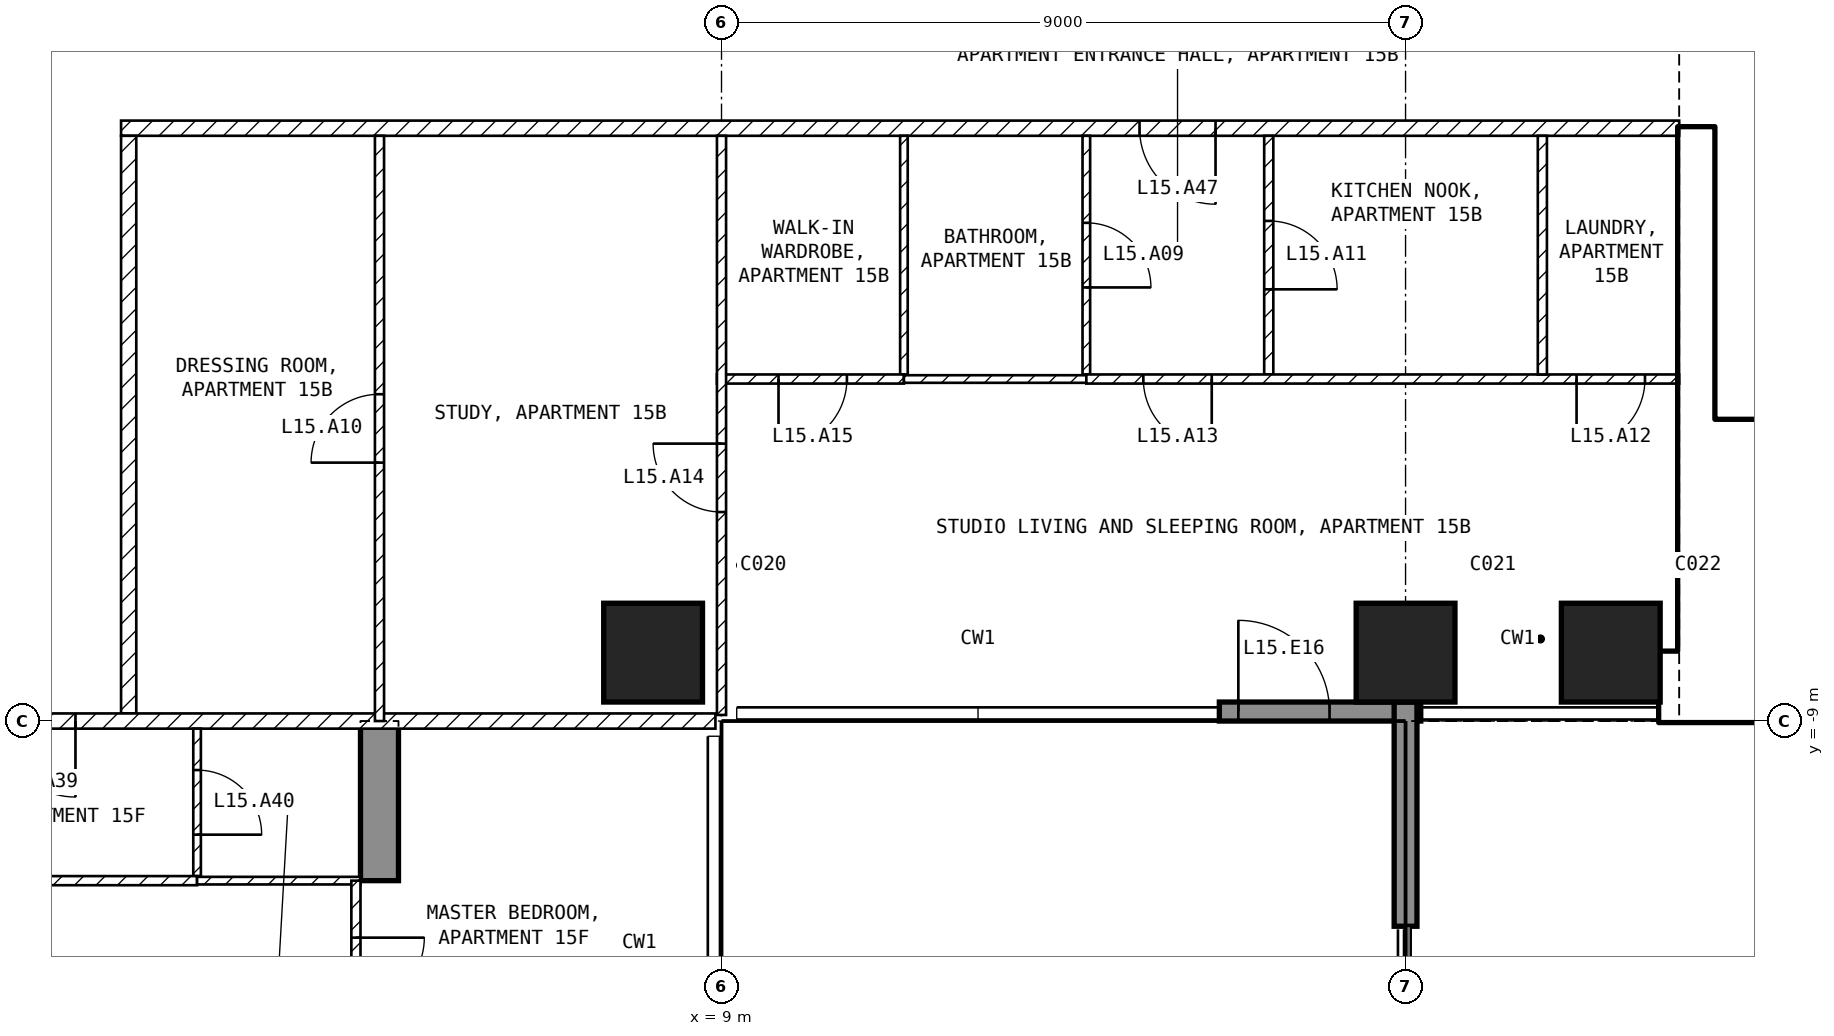
"""IFC4 building model, lengths in metres.
Left out: names, types, materials, properties, quantities, classifications, styles, units other than length and angle.
Written with IfcOpenShell. Run it as: python <this file> out.ifc"""

import sys

from ifc_helpers import new_model, si_unit, direction, frame, frame_2d, origin, origin_2d, place, context, subcontext, project, spatial, polyline, rectangle, outline, extrude, element, fill, save


model = new_model("IFC4")
c1 = context("Model", 3, precision=1e-05, world=origin(), true_north=direction((0.0, 1.0)))
c2 = subcontext(c1, "Body", "Model", "MODEL_VIEW")
j1 = project(units=[si_unit("LENGTHUNIT", "METRE"), si_unit("PLANEANGLEUNIT", "RADIAN")], contexts=[c1])
p1 = place(None, origin())
s1 = spatial("IfcSite", under=j1, at=p1, CompositionType="ELEMENT")
p2 = place(p1, origin())
s2 = spatial("IfcBuilding", under=s1, at=p2, CompositionType="ELEMENT")
p3 = place(p2, frame((0.0, 0.0, 71.5)))
s3 = spatial("IfcBuildingStorey", under=s2, at=p3, CompositionType="ELEMENT", Elevation=71.5)
for number, where, z_axis, x_axis in (
    (1, (8.1, -8.1, -0.25), (0.0, 0.0, 1.0), (1.0, 0.0, 0.0)),
    (2, (18.0, -8.1, -0.25), (0.0, 0.0, 1.0), (1.0, 0.0, 0.0)),
    (3, (20.7, -8.1, -0.25), (0.0, 0.0, 1.0), (1.0, 0.0, 0.0)),
):
    element("IfcColumn", number, at=place(p3, frame(where, z_axis=z_axis, x_axis=x_axis)), inside=s3, PredefinedType="COLUMN", context=c2, shape_type="SweptSolid", body=[
        extrude(rectangle(XDim=1.3, YDim=1.3, at=origin_2d()), origin(), (0.0, 0.0, 1.0), 3.5),
    ])
p4 = place(p3, frame((4.25, -25.45, -0.25), z_axis=(1.0, 0.0, 0.0), x_axis=(0.0, 1.0, 0.0)))
e4 = element("IfcWall", 4, at=p4, inside=s3, PredefinedType="SHEAR", context=c2, shape_type="SweptSolid", body=[
    extrude(outline(polyline([(0.0, 0.0), (4.15, 0.0), (4.15, 2.65), (6.55, 2.65), (6.55, 0.0), (11.95, 0.0), (11.95, 2.65), (14.35, 2.65), (14.35, 0.0), (16.45, 0.0), (16.45, 3.5), (0.0, 3.5), (0.0, 0.0)])), origin(), (0.0, 0.0, 1.0), 0.5),
])
p5 = place(p3, frame((15.55, -8.875, 0.0), z_axis=(0.0, 0.0, 1.0), x_axis=(1.0, 0.0, 0.0)))
e5 = element("IfcWall", 5, at=p5, inside=s3, PredefinedType="SOLIDWALL", context=c2, shape_type="SweptSolid", body=[
    extrude(rectangle(XDim=2.65, YDim=0.25, at=frame_2d((1.325, 0.0))), origin(), (0.0, 0.0, 1.0), 3.25),
])
p6 = place(p5, frame((0.25, 0.0, 0.0)))
e6 = element("IfcOpeningElement", 6, at=p6, cuts=e5, PredefinedType="OPENING", context=c2, shape_type="SweptSolid", body=[
    extrude(rectangle(XDim=1.2, YDim=2.4, at=frame_2d((0.6, 1.2))), frame((0.0, 0.135, 0.0), z_axis=(0.0, -1.0, 0.0), x_axis=(1.0, 0.0, 0.0)), (0.0, 0.0, 1.0), 0.27),
])
p7 = place(p3, frame((18.0, -8.75, 0.0), z_axis=(0.0, 0.0, 1.0), x_axis=(0.0, -1.0, 0.0)))
e7 = element("IfcWall", 7, at=p7, inside=s3, PredefinedType="SOLIDWALL", context=c2, shape_type="SweptSolid", body=[
    extrude(rectangle(XDim=2.95, YDim=0.3, at=frame_2d((1.475, 0.0))), origin(), (0.0, 0.0, 1.0), 3.25),
])
p8 = place(p3, frame((21.35, -8.55, 0.0), z_axis=(0.0, 0.0, 1.0), x_axis=(1.0, 0.0, 0.0)))
e8 = element("IfcWall", 8, at=p8, inside=s3, PredefinedType="SHEAR", context=c2, shape_type="SweptSolid", body=[
    extrude(rectangle(XDim=11.05, YDim=0.9, at=frame_2d((5.525, 0.0))), origin(), (0.0, 0.0, 1.0), 3.25),
])
p9 = place(p3, frame((21.825, -8.1, 0.0), z_axis=(0.0, 0.0, 1.0), x_axis=(0.0, 1.0, 0.0)))
e9 = element("IfcWall", 9, at=p9, inside=s3, PredefinedType="SHEAR", context=c2, shape_type="SweptSolid", body=[
    extrude(rectangle(XDim=6.9, YDim=0.45, at=frame_2d((3.45, 0.0))), origin(), (0.0, 0.0, 1.0), 3.25),
])
p10 = place(p3, frame((22.05, -5.15, 0.0), z_axis=(0.0, 0.0, 1.0), x_axis=(1.0, 0.0, 0.0)))
e10 = element("IfcWall", 10, at=p10, inside=s3, PredefinedType="SOLIDWALL", context=c2, shape_type="SweptSolid", body=[
    extrude(rectangle(XDim=6.3, YDim=0.2, at=frame_2d((3.15, 0.0))), origin(), (0.0, 0.0, 1.0), 3.25),
])
p11 = place(p10, frame((0.2, 0.0, 0.0)))
e11 = element("IfcOpeningElement", 11, at=p11, cuts=e10, PredefinedType="OPENING", context=c2, shape_type="SweptSolid", body=[
    extrude(rectangle(XDim=1.0, YDim=2.1, at=frame_2d((0.5, 1.05))), frame((0.0, 0.11, 0.0), z_axis=(0.0, -1.0, 0.0), x_axis=(1.0, 0.0, 0.0)), (0.0, 0.0, 1.0), 0.22),
])
p12 = place(p3, frame((21.6, -1.2, 0.0), z_axis=(0.0, 0.0, 1.0), x_axis=(-1.0, 0.0, 0.0)))
e12 = element("IfcWall", 12, at=p12, inside=s3, PredefinedType="PARTITIONING", context=c2, shape_type="SweptSolid", body=[
    extrude(rectangle(XDim=20.5, YDim=0.2, at=frame_2d((10.25, 0.0))), origin(), (0.0, 0.0, 1.0), 3.25),
])
p13 = place(p12, frame((6.1, 0.0, 0.0)))
e13 = element("IfcOpeningElement", 13, at=p13, cuts=e12, PredefinedType="OPENING", context=c2, shape_type="SweptSolid", body=[
    extrude(rectangle(XDim=1.0, YDim=2.1, at=frame_2d((0.5, 1.05))), frame((0.0, 0.11, 0.0), z_axis=(0.0, -1.0, 0.0), x_axis=(1.0, 0.0, 0.0)), (0.0, 0.0, 1.0), 0.22),
])
p14 = place(p3, frame((1.2, -1.3, 0.0), z_axis=(0.0, 0.0, 1.0), x_axis=(0.0, -1.0, 0.0)))
e14 = element("IfcWall", 14, at=p14, inside=s3, PredefinedType="PARTITIONING", context=c2, shape_type="SweptSolid", body=[
    extrude(rectangle(XDim=7.6, YDim=0.2, at=frame_2d((3.8, 0.0))), origin(), (0.0, 0.0, 1.0), 3.25),
])
p15 = place(p3, frame((8.92, -9.0, 0.0), z_axis=(0.0, 0.0, 1.0), x_axis=(-1.0, 0.0, 0.0)))
e15 = element("IfcWall", 15, at=p15, inside=s3, PredefinedType="PARTITIONING", context=c2, shape_type="SweptSolid", body=[
    extrude(rectangle(XDim=17.84, YDim=0.2, at=frame_2d((8.92, 0.0))), origin(), (0.0, 0.0, 1.0), 3.25),
])
p16 = place(p15, frame((8.42, 0.0, 0.0)))
e16 = element("IfcOpeningElement", 16, at=p16, cuts=e15, PredefinedType="OPENING", context=c2, shape_type="SweptSolid", body=[
    extrude(rectangle(XDim=1.0, YDim=2.1, at=frame_2d((0.5, 1.05))), frame((0.0, 0.11, 0.0), z_axis=(0.0, -1.0, 0.0), x_axis=(1.0, 0.0, 0.0)), (0.0, 0.0, 1.0), 0.22),
])
p17 = place(p3, frame((11.4, -1.3, 0.0), z_axis=(0.0, 0.0, 1.0), x_axis=(0.0, -1.0, 0.0)))
e17 = element("IfcWall", 17, at=p17, inside=s3, PredefinedType="PARTITIONING", context=c2, shape_type="SweptSolid", body=[
    extrude(rectangle(XDim=3.14, YDim=0.1, at=frame_2d((1.57, 0.0))), origin(), (0.0, 0.0, 1.0), 3.25),
])
p18 = place(p3, frame((11.4, -4.5, 0.0), z_axis=(0.0, 0.0, 1.0), x_axis=(-1.0, 0.0, 0.0)))
e18 = element("IfcWall", 18, at=p18, inside=s3, PredefinedType="PARTITIONING", context=c2, shape_type="SweptSolid", body=[
    extrude(rectangle(XDim=2.46, YDim=0.12, at=frame_2d((1.23, 0.0))), origin(), (0.0, 0.0, 1.0), 3.25),
])
p19 = place(p18, frame((0.75, 0.0, 0.0)))
e19 = element("IfcOpeningElement", 19, at=p19, cuts=e18, PredefinedType="OPENING", context=c2, shape_type="SweptSolid", body=[
    extrude(rectangle(XDim=0.9, YDim=2.1, at=frame_2d((0.45, 1.05))), frame((0.0, 0.07, 0.0), z_axis=(0.0, -1.0, 0.0), x_axis=(1.0, 0.0, 0.0)), (0.0, 0.0, 1.0), 0.14),
])
p20 = place(p3, frame((9.0, -8.92, 0.0), z_axis=(0.0, 0.0, 1.0), x_axis=(0.0, 1.0, 0.0)))
e20 = element("IfcWall", 20, at=p20, inside=s3, PredefinedType="PARTITIONING", context=c2, shape_type="SweptSolid", body=[
    extrude(rectangle(XDim=7.62, YDim=0.12, at=frame_2d((3.81, 0.0))), origin(), (0.0, 0.0, 1.0), 3.25),
])
p21 = place(p20, frame((2.67, 0.0, 0.0)))
e21 = element("IfcOpeningElement", 21, at=p21, cuts=e20, PredefinedType="OPENING", context=c2, shape_type="SweptSolid", body=[
    extrude(rectangle(XDim=0.9, YDim=2.1, at=frame_2d((0.45, 1.05))), frame((0.0, 0.07, 0.0), z_axis=(0.0, -1.0, 0.0), x_axis=(1.0, 0.0, 0.0)), (0.0, 0.0, 1.0), 0.14),
])
p22 = place(p3, frame((13.8, -1.3, 0.0), z_axis=(0.0, 0.0, 1.0), x_axis=(0.0, -1.0, 0.0)))
e22 = element("IfcWall", 22, at=p22, inside=s3, PredefinedType="PARTITIONING", context=c2, shape_type="SweptSolid", body=[
    extrude(rectangle(XDim=3.14, YDim=0.1, at=frame_2d((1.57, 0.0))), origin(), (0.0, 0.0, 1.0), 3.25),
])
p23 = place(p22, frame((1.145, 0.0, 0.0)))
e23 = element("IfcOpeningElement", 23, at=p23, cuts=e22, PredefinedType="OPENING", context=c2, shape_type="SweptSolid", body=[
    extrude(rectangle(XDim=0.85, YDim=2.1, at=frame_2d((0.425, 1.05))), frame((0.0, 0.06, 0.0), z_axis=(0.0, -1.0, 0.0), x_axis=(1.0, 0.0, 0.0)), (0.0, 0.0, 1.0), 0.12),
])
p24 = place(p3, frame((13.8, -4.5, 0.0), z_axis=(0.0, 0.0, 1.0), x_axis=(-1.0, 0.0, 0.0)))
e24 = element("IfcWall", 24, at=p24, inside=s3, PredefinedType="PARTITIONING", context=c2, shape_type="SweptSolid", body=[
    extrude(rectangle(XDim=2.4, YDim=0.1, at=frame_2d((1.2, 0.0))), origin(), (0.0, 0.0, 1.0), 3.25),
])
p25 = place(p3, frame((16.2, -1.3, 0.0), z_axis=(0.0, 0.0, 1.0), x_axis=(0.0, -1.0, 0.0)))
e25 = element("IfcWall", 25, at=p25, inside=s3, PredefinedType="PARTITIONING", context=c2, shape_type="SweptSolid", body=[
    extrude(rectangle(XDim=3.14, YDim=0.12, at=frame_2d((1.57, 0.0))), origin(), (0.0, 0.0, 1.0), 3.25),
])
p26 = place(p25, frame((1.12, 0.0, 0.0)))
e26 = element("IfcOpeningElement", 26, at=p26, cuts=e25, PredefinedType="OPENING", context=c2, shape_type="SweptSolid", body=[
    extrude(rectangle(XDim=0.9, YDim=2.1, at=frame_2d((0.45, 1.05))), frame((0.0, 0.07, 0.0), z_axis=(0.0, -1.0, 0.0), x_axis=(1.0, 0.0, 0.0)), (0.0, 0.0, 1.0), 0.14),
])
p27 = place(p3, frame((21.6, -4.5, 0.0), z_axis=(0.0, 0.0, 1.0), x_axis=(-1.0, 0.0, 0.0)))
e27 = element("IfcWall", 27, at=p27, inside=s3, PredefinedType="PARTITIONING", context=c2, shape_type="SweptSolid", body=[
    extrude(rectangle(XDim=7.8, YDim=0.12, at=frame_2d((3.9, 0.0))), origin(), (0.0, 0.0, 1.0), 3.25),
])
p28 = place(p27, frame((0.45, 0.0, 0.0)))
e28 = element("IfcOpeningElement", 28, at=p28, cuts=e27, PredefinedType="OPENING", context=c2, shape_type="SweptSolid", body=[
    extrude(rectangle(XDim=0.9, YDim=2.1, at=frame_2d((0.45, 1.05))), frame((0.0, 0.07, 0.0), z_axis=(0.0, -1.0, 0.0), x_axis=(1.0, 0.0, 0.0)), (0.0, 0.0, 1.0), 0.14),
])
p29 = place(p27, frame((6.15, 0.0, 0.0)))
e29 = element("IfcOpeningElement", 29, at=p29, cuts=e27, PredefinedType="OPENING", context=c2, shape_type="SweptSolid", body=[
    extrude(rectangle(XDim=0.9, YDim=2.1, at=frame_2d((0.45, 1.05))), frame((0.0, 0.07, 0.0), z_axis=(0.0, -1.0, 0.0), x_axis=(1.0, 0.0, 0.0)), (0.0, 0.0, 1.0), 0.14),
])
p30 = place(p3, frame((19.8, -1.3, 0.0), z_axis=(0.0, 0.0, 1.0), x_axis=(0.0, -1.0, 0.0)))
e30 = element("IfcWall", 30, at=p30, inside=s3, PredefinedType="PARTITIONING", context=c2, shape_type="SweptSolid", body=[
    extrude(rectangle(XDim=3.14, YDim=0.12, at=frame_2d((1.57, 0.0))), origin(), (0.0, 0.0, 1.0), 3.25),
])
p31 = place(p3, frame((4.5, -9.0, 0.0), z_axis=(0.0, 0.0, 1.0), x_axis=(0.0, 1.0, 0.0)))
e31 = element("IfcWall", 31, at=p31, inside=s3, PredefinedType="PARTITIONING", context=c2, shape_type="SweptSolid", body=[
    extrude(rectangle(XDim=7.7, YDim=0.12, at=frame_2d((3.85, 0.0))), origin(), (0.0, 0.0, 1.0), 3.25),
])
p32 = place(p31, frame((3.4, 0.0, 0.0)))
e32 = element("IfcOpeningElement", 32, at=p32, cuts=e31, PredefinedType="OPENING", context=c2, shape_type="SweptSolid", body=[
    extrude(rectangle(XDim=0.9, YDim=2.1, at=frame_2d((0.45, 1.05))), frame((0.0, 0.07, 0.0), z_axis=(0.0, -1.0, 0.0), x_axis=(1.0, 0.0, 0.0)), (0.0, 0.0, 1.0), 0.14),
])
p33 = place(p3, frame((2.1, -9.1, 0.0), z_axis=(0.0, 0.0, 1.0), x_axis=(0.0, -1.0, 0.0)))
e33 = element("IfcWall", 33, at=p33, inside=s3, PredefinedType="PARTITIONING", context=c2, shape_type="SweptSolid", body=[
    extrude(rectangle(XDim=1.94, YDim=0.1, at=frame_2d((0.97, 0.0))), origin(), (0.0, 0.0, 1.0), 3.25),
])
p34 = place(p33, frame((0.545, 0.0, 0.0)))
e34 = element("IfcOpeningElement", 34, at=p34, cuts=e33, PredefinedType="OPENING", context=c2, shape_type="SweptSolid", body=[
    extrude(rectangle(XDim=0.85, YDim=2.1, at=frame_2d((0.425, 1.05))), frame((0.0, 0.06, 0.0), z_axis=(0.0, -1.0, 0.0), x_axis=(1.0, 0.0, 0.0)), (0.0, 0.0, 1.0), 0.12),
])
p35 = place(p3, frame((2.1, -11.1, 0.0), z_axis=(0.0, 0.0, 1.0), x_axis=(-1.0, 0.0, 0.0)))
e35 = element("IfcWall", 35, at=p35, inside=s3, PredefinedType="PARTITIONING", context=c2, shape_type="SweptSolid", body=[
    extrude(rectangle(XDim=6.35, YDim=0.12, at=frame_2d((3.175, 0.0))), origin(), (0.0, 0.0, 1.0), 3.25),
])
p36 = place(p35, frame((2.725, 0.0, 0.0)))
e36 = element("IfcOpeningElement", 36, at=p36, cuts=e35, PredefinedType="OPENING", context=c2, shape_type="SweptSolid", body=[
    extrude(rectangle(XDim=0.9, YDim=2.1, at=frame_2d((0.45, 1.05))), frame((0.0, 0.07, 0.0), z_axis=(0.0, -1.0, 0.0), x_axis=(1.0, 0.0, 0.0)), (0.0, 0.0, 1.0), 0.14),
])
p37 = place(p3, frame((4.25, -11.1, 0.0), z_axis=(0.0, 0.0, 1.0), x_axis=(-1.0, 0.0, 0.0)))
e37 = element("IfcWall", 37, at=p37, inside=s3, PredefinedType="PARTITIONING", context=c2, shape_type="SweptSolid", body=[
    extrude(rectangle(XDim=2.15, YDim=0.1, at=frame_2d((1.075, 0.0))), origin(), (0.0, 0.0, 1.0), 3.25),
])
p38 = place(p3, frame((4.19, -11.1, 0.0), z_axis=(0.0, 0.0, 1.0), x_axis=(0.0, -1.0, 0.0)))
e38 = element("IfcWall", 38, at=p38, inside=s3, PredefinedType="PARTITIONING", context=c2, shape_type="SweptSolid", body=[
    extrude(rectangle(XDim=2.4, YDim=0.12, at=frame_2d((1.2, 0.0))), origin(), (0.0, 0.0, 1.0), 2.4),
])
p39 = place(p38, frame((0.75, 0.0, 0.0)))
e39 = element("IfcOpeningElement", 39, at=p39, cuts=e38, PredefinedType="OPENING", context=c2, shape_type="SweptSolid", body=[
    extrude(rectangle(XDim=0.9, YDim=2.1, at=frame_2d((0.45, 1.05))), frame((0.0, 0.07, 0.0), z_axis=(0.0, -1.0, 0.0), x_axis=(1.0, 0.0, 0.0)), (0.0, 0.0, 1.0), 0.14),
])
p40 = place(p6, origin())
e40 = element("IfcDoor", 40, at=p40, inside=s3, OperationType="SINGLE_SWING_LEFT", PredefinedType="DOOR", context=c2, shape_type="SweptSolid", body=[
    extrude(rectangle(XDim=1.2, YDim=2.4, at=frame_2d((0.6, 1.2))), frame((0.0, 0.025, 0.0), z_axis=(0.0, -1.0, 0.0), x_axis=(1.0, 0.0, 0.0)), (0.0, 0.0, 1.0), 0.05),
])
fill(e6, e40)
p41 = place(p11, origin())
e41 = element("IfcDoor", 41, at=p41, inside=s3, OperationType="SINGLE_SWING_LEFT", PredefinedType="DOOR", context=c2, shape_type="SweptSolid", body=[
    extrude(rectangle(XDim=1.0, YDim=2.1, at=frame_2d((0.5, 1.05))), frame((0.0, 0.025, 0.0), z_axis=(0.0, -1.0, 0.0), x_axis=(1.0, 0.0, 0.0)), (0.0, 0.0, 1.0), 0.05),
])
fill(e11, e41)
p42 = place(p23, origin())
e42 = element("IfcDoor", 42, at=p42, inside=s3, OperationType="SINGLE_SWING_RIGHT", PredefinedType="DOOR", context=c2, shape_type="SweptSolid", body=[
    extrude(rectangle(XDim=0.85, YDim=2.1, at=frame_2d((0.425, 1.05))), frame((0.0, 0.025, 0.0), z_axis=(0.0, -1.0, 0.0), x_axis=(1.0, 0.0, 0.0)), (0.0, 0.0, 1.0), 0.05),
])
fill(e23, e42)
p43 = place(p32, origin())
e43 = element("IfcDoor", 43, at=p43, inside=s3, OperationType="SINGLE_SWING_LEFT", PredefinedType="DOOR", context=c2, shape_type="SweptSolid", body=[
    extrude(rectangle(XDim=0.9, YDim=2.1, at=frame_2d((0.45, 1.05))), frame((0.0, 0.025, 0.0), z_axis=(0.0, -1.0, 0.0), x_axis=(1.0, 0.0, 0.0)), (0.0, 0.0, 1.0), 0.05),
])
fill(e32, e43)
p44 = place(p26, origin())
e44 = element("IfcDoor", 44, at=p44, inside=s3, OperationType="SINGLE_SWING_RIGHT", PredefinedType="DOOR", context=c2, shape_type="SweptSolid", body=[
    extrude(rectangle(XDim=0.9, YDim=2.1, at=frame_2d((0.45, 1.05))), frame((0.0, 0.025, 0.0), z_axis=(0.0, -1.0, 0.0), x_axis=(1.0, 0.0, 0.0)), (0.0, 0.0, 1.0), 0.05),
])
fill(e26, e44)
p45 = place(p28, origin())
e45 = element("IfcDoor", 45, at=p45, inside=s3, OperationType="SINGLE_SWING_RIGHT", PredefinedType="DOOR", context=c2, shape_type="SweptSolid", body=[
    extrude(rectangle(XDim=0.9, YDim=2.1, at=frame_2d((0.45, 1.05))), frame((0.0, 0.025, 0.0), z_axis=(0.0, -1.0, 0.0), x_axis=(1.0, 0.0, 0.0)), (0.0, 0.0, 1.0), 0.05),
])
fill(e28, e45)
p46 = place(p29, origin())
e46 = element("IfcDoor", 46, at=p46, inside=s3, OperationType="SINGLE_SWING_LEFT", PredefinedType="DOOR", context=c2, shape_type="SweptSolid", body=[
    extrude(rectangle(XDim=0.9, YDim=2.1, at=frame_2d((0.45, 1.05))), frame((0.0, 0.025, 0.0), z_axis=(0.0, -1.0, 0.0), x_axis=(1.0, 0.0, 0.0)), (0.0, 0.0, 1.0), 0.05),
])
fill(e29, e46)
p47 = place(p21, origin())
e47 = element("IfcDoor", 47, at=p47, inside=s3, OperationType="SINGLE_SWING_RIGHT", PredefinedType="DOOR", context=c2, shape_type="SweptSolid", body=[
    extrude(rectangle(XDim=0.9, YDim=2.1, at=frame_2d((0.45, 1.05))), frame((0.0, 0.025, 0.0), z_axis=(0.0, -1.0, 0.0), x_axis=(1.0, 0.0, 0.0)), (0.0, 0.0, 1.0), 0.05),
])
fill(e21, e47)
p48 = place(p19, origin())
e48 = element("IfcDoor", 48, at=p48, inside=s3, OperationType="SINGLE_SWING_RIGHT", PredefinedType="DOOR", context=c2, shape_type="SweptSolid", body=[
    extrude(rectangle(XDim=0.9, YDim=2.1, at=frame_2d((0.45, 1.05))), frame((0.0, 0.025, 0.0), z_axis=(0.0, -1.0, 0.0), x_axis=(1.0, 0.0, 0.0)), (0.0, 0.0, 1.0), 0.05),
])
fill(e19, e48)
p49 = place(p16, origin())
e49 = element("IfcDoor", 49, at=p49, inside=s3, OperationType="SINGLE_SWING_LEFT", PredefinedType="DOOR", context=c2, shape_type="SweptSolid", body=[
    extrude(rectangle(XDim=1.0, YDim=2.1, at=frame_2d((0.5, 1.05))), frame((0.0, 0.025, 0.0), z_axis=(0.0, -1.0, 0.0), x_axis=(1.0, 0.0, 0.0)), (0.0, 0.0, 1.0), 0.05),
])
fill(e16, e49)
p50 = place(p34, origin())
e50 = element("IfcDoor", 50, at=p50, inside=s3, OperationType="SINGLE_SWING_RIGHT", PredefinedType="DOOR", context=c2, shape_type="SweptSolid", body=[
    extrude(rectangle(XDim=0.85, YDim=2.1, at=frame_2d((0.425, 1.05))), frame((0.0, 0.025, 0.0), z_axis=(0.0, -1.0, 0.0), x_axis=(1.0, 0.0, 0.0)), (0.0, 0.0, 1.0), 0.05),
])
fill(e34, e50)
p51 = place(p13, origin())
e51 = element("IfcDoor", 51, at=p51, inside=s3, OperationType="SINGLE_SWING_LEFT", PredefinedType="DOOR", context=c2, shape_type="SweptSolid", body=[
    extrude(rectangle(XDim=1.0, YDim=2.1, at=frame_2d((0.5, 1.05))), frame((0.0, 0.025, 0.0), z_axis=(0.0, -1.0, 0.0), x_axis=(1.0, 0.0, 0.0)), (0.0, 0.0, 1.0), 0.05),
])
fill(e13, e51)
p52 = place(p39, origin())
e52 = element("IfcDoor", 52, at=p52, inside=s3, OperationType="SINGLE_SWING_LEFT", PredefinedType="DOOR", context=c2, shape_type="SweptSolid", body=[
    extrude(rectangle(XDim=0.9, YDim=2.1, at=frame_2d((0.45, 1.05))), frame((0.0, 0.025, 0.0), z_axis=(0.0, -1.0, 0.0), x_axis=(1.0, 0.0, 0.0)), (0.0, 0.0, 1.0), 0.05),
])
fill(e39, e52)
save(model, sys.argv[1])
